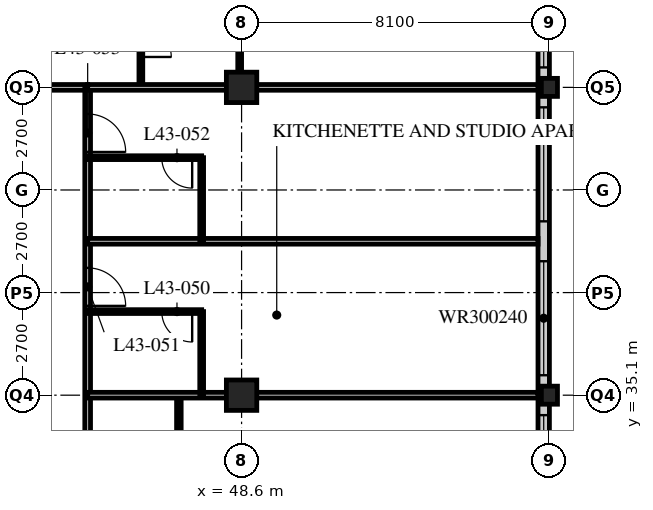
"""IFC4 building model, lengths in metres.
Left out: names, types, materials, properties, quantities, classifications, styles, units other than length and angle.
Written with IfcOpenShell. Run it as: python <this file> out.ifc"""

import sys

from ifc_helpers import new_model, si_unit, direction, frame, frame_2d, origin, origin_2d, place, context, subcontext, project, spatial, rectangle, hollow_rectangle, i_section, extrude, element, fill, save


model = new_model("IFC4")
c1 = context("Model", 3, precision=1e-05, world=origin(), true_north=direction((0.0, 1.0)))
c2 = subcontext(c1, "Body", "Model", "MODEL_VIEW")
j1 = project(units=[si_unit("LENGTHUNIT", "METRE"), si_unit("PLANEANGLEUNIT", "RADIAN")], contexts=[c1])
p1 = place(None, origin())
s1 = spatial("IfcSite", under=j1, at=p1, CompositionType="ELEMENT")
p2 = place(p1, origin())
s2 = spatial("IfcBuilding", under=s1, at=p2, CompositionType="ELEMENT")
p3 = place(p2, frame((0.0, 0.0, 170.4)))
s3 = spatial("IfcBuildingStorey", under=s2, at=p3, CompositionType="ELEMENT", Elevation=170.4)
for number, where, z_axis, x_axis in (
    (1, (48.6, 35.1, 0.0), (0.0, 0.0, 1.0), (1.0, 0.0, 0.0)),
    (2, (48.6, 43.2, 0.0), (0.0, 0.0, 1.0), (1.0, 0.0, 0.0)),
):
    element("IfcColumn", number, at=place(p3, frame(where, z_axis=z_axis, x_axis=x_axis)), inside=s3, PredefinedType="COLUMN", context=c2, shape_type="SweptSolid", body=[
        extrude(hollow_rectangle(XDim=0.8, YDim=0.8, WallThickness=0.08, at=origin_2d()), origin(), (0.0, 0.0, 1.0), 3.6),
    ])
for number, where, z_axis, x_axis in (
    (3, (56.7, 35.1, 0.0), (0.0, 0.0, 1.0), (1.0, 0.0, 0.0)),
    (4, (56.7, 43.2, 0.0), (0.0, 0.0, 1.0), (1.0, 0.0, 0.0)),
):
    element("IfcColumn", number, at=place(p3, frame(where, z_axis=z_axis, x_axis=x_axis)), inside=s3, PredefinedType="COLUMN", context=c2, shape_type="SweptSolid", body=[
        extrude(i_section(OverallWidth=0.424, OverallDepth=0.475, WebThickness=0.048, FlangeThickness=0.077, FilletRadius=0.015, at=origin_2d()), origin(), (0.0, 0.0, 1.0), 3.6),
    ])
p4 = place(p3, frame((56.55, 19.2, 0.0), z_axis=(0.0, 0.0, 1.0), x_axis=(0.0, 1.0, 0.0)))
e5 = element("IfcWall", 5, at=p4, inside=s3, PredefinedType="SOLIDWALL", context=c2, shape_type="SweptSolid", body=[
    extrude(rectangle(XDim=32.1, YDim=0.3, at=frame_2d((16.05, 0.0))), origin(), (0.0, 0.0, 1.0), 3.39),
])
p5 = place(p4, frame((0.225, 0.0, 0.6)))
e6 = element("IfcOpeningElement", 6, at=p5, cuts=e5, PredefinedType="OPENING", context=c2, shape_type="SweptSolid", body=[
    extrude(rectangle(XDim=3.0, YDim=2.4, at=frame_2d((1.5, 1.2))), frame((0.0, 0.16, 0.0), z_axis=(0.0, -1.0, 0.0), x_axis=(1.0, 0.0, 0.0)), (0.0, 0.0, 1.0), 0.32),
])
p6 = place(p4, frame((4.275, 0.0, 0.6)))
e7 = element("IfcOpeningElement", 7, at=p6, cuts=e5, PredefinedType="OPENING", context=c2, shape_type="SweptSolid", body=[
    extrude(rectangle(XDim=3.0, YDim=2.4, at=frame_2d((1.5, 1.2))), frame((0.0, 0.16, 0.0), z_axis=(0.0, -1.0, 0.0), x_axis=(1.0, 0.0, 0.0)), (0.0, 0.0, 1.0), 0.32),
])
p7 = place(p4, frame((8.325, 0.0, 0.6)))
e8 = element("IfcOpeningElement", 8, at=p7, cuts=e5, PredefinedType="OPENING", context=c2, shape_type="SweptSolid", body=[
    extrude(rectangle(XDim=3.0, YDim=2.4, at=frame_2d((1.5, 1.2))), frame((0.0, 0.16, 0.0), z_axis=(0.0, -1.0, 0.0), x_axis=(1.0, 0.0, 0.0)), (0.0, 0.0, 1.0), 0.32),
])
p8 = place(p4, frame((12.375, 0.0, 0.6)))
e9 = element("IfcOpeningElement", 9, at=p8, cuts=e5, PredefinedType="OPENING", context=c2, shape_type="SweptSolid", body=[
    extrude(rectangle(XDim=3.0, YDim=2.4, at=frame_2d((1.5, 1.2))), frame((0.0, 0.16, 0.0), z_axis=(0.0, -1.0, 0.0), x_axis=(1.0, 0.0, 0.0)), (0.0, 0.0, 1.0), 0.32),
])
p9 = place(p4, frame((16.425, 0.0, 0.6)))
e10 = element("IfcOpeningElement", 10, at=p9, cuts=e5, PredefinedType="OPENING", context=c2, shape_type="SweptSolid", body=[
    extrude(rectangle(XDim=3.0, YDim=2.4, at=frame_2d((1.5, 1.2))), frame((0.0, 0.16, 0.0), z_axis=(0.0, -1.0, 0.0), x_axis=(1.0, 0.0, 0.0)), (0.0, 0.0, 1.0), 0.32),
])
p10 = place(p4, frame((20.475, 0.0, 0.6)))
e11 = element("IfcOpeningElement", 11, at=p10, cuts=e5, PredefinedType="OPENING", context=c2, shape_type="SweptSolid", body=[
    extrude(rectangle(XDim=3.0, YDim=2.4, at=frame_2d((1.5, 1.2))), frame((0.0, 0.16, 0.0), z_axis=(0.0, -1.0, 0.0), x_axis=(1.0, 0.0, 0.0)), (0.0, 0.0, 1.0), 0.32),
])
p11 = place(p4, frame((24.525, 0.0, 0.6)))
e12 = element("IfcOpeningElement", 12, at=p11, cuts=e5, PredefinedType="OPENING", context=c2, shape_type="SweptSolid", body=[
    extrude(rectangle(XDim=3.0, YDim=2.4, at=frame_2d((1.5, 1.2))), frame((0.0, 0.16, 0.0), z_axis=(0.0, -1.0, 0.0), x_axis=(1.0, 0.0, 0.0)), (0.0, 0.0, 1.0), 0.32),
])
p12 = place(p4, frame((28.575, 0.0, 0.6)))
e13 = element("IfcOpeningElement", 13, at=p12, cuts=e5, PredefinedType="OPENING", context=c2, shape_type="SweptSolid", body=[
    extrude(rectangle(XDim=3.0, YDim=2.4, at=frame_2d((1.5, 1.2))), frame((0.0, 0.16, 0.0), z_axis=(0.0, -1.0, 0.0), x_axis=(1.0, 0.0, 0.0)), (0.0, 0.0, 1.0), 0.32),
])
p13 = place(p3, frame((12.15, 43.2, 0.0), z_axis=(0.0, 0.0, 1.0), x_axis=(1.0, 0.0, 0.0)))
e14 = element("IfcWall", 14, at=p13, inside=s3, PredefinedType="PARTITIONING", context=c2, shape_type="SweptSolid", body=[
    extrude(rectangle(XDim=32.4, YDim=0.15, at=frame_2d((16.2, 0.0))), origin(), (0.0, 0.0, 1.0), 2.778),
])
p14 = place(p13, frame((4.95, 0.0, 0.0)))
e15 = element("IfcOpeningElement", 15, at=p14, cuts=e14, PredefinedType="OPENING", context=c2, shape_type="SweptSolid", body=[
    extrude(rectangle(XDim=1.0, YDim=2.1, at=frame_2d((0.5, 1.05))), frame((0.0, 0.085, 0.0), z_axis=(0.0, -1.0, 0.0), x_axis=(1.0, 0.0, 0.0)), (0.0, 0.0, 1.0), 0.17),
])
p15 = place(p13, frame((13.05, 0.0, 0.0)))
e16 = element("IfcOpeningElement", 16, at=p15, cuts=e14, PredefinedType="OPENING", context=c2, shape_type="SweptSolid", body=[
    extrude(rectangle(XDim=1.0, YDim=2.1, at=frame_2d((0.5, 1.05))), frame((0.0, 0.085, 0.0), z_axis=(0.0, -1.0, 0.0), x_axis=(1.0, 0.0, 0.0)), (0.0, 0.0, 1.0), 0.17),
])
p16 = place(p13, frame((21.15, 0.0, 0.0)))
e17 = element("IfcOpeningElement", 17, at=p16, cuts=e14, PredefinedType="OPENING", context=c2, shape_type="SweptSolid", body=[
    extrude(rectangle(XDim=1.0, YDim=2.1, at=frame_2d((0.5, 1.05))), frame((0.0, 0.085, 0.0), z_axis=(0.0, -1.0, 0.0), x_axis=(1.0, 0.0, 0.0)), (0.0, 0.0, 1.0), 0.17),
])
p17 = place(p13, frame((29.875, 0.0, 0.0)))
e18 = element("IfcOpeningElement", 18, at=p17, cuts=e14, PredefinedType="OPENING", context=c2, shape_type="SweptSolid", body=[
    extrude(rectangle(XDim=1.0, YDim=2.1, at=frame_2d((0.5, 1.05))), frame((0.0, 0.085, 0.0), z_axis=(0.0, -1.0, 0.0), x_axis=(1.0, 0.0, 0.0)), (0.0, 0.0, 1.0), 0.17),
])
p18 = place(p13, frame((1.525, 0.0, 0.0)))
e19 = element("IfcOpeningElement", 19, at=p18, cuts=e14, PredefinedType="OPENING", context=c2, shape_type="SweptSolid", body=[
    extrude(rectangle(XDim=1.0, YDim=2.1, at=frame_2d((0.5, 1.05))), frame((0.0, 0.085, 0.0), z_axis=(0.0, -1.0, 0.0), x_axis=(1.0, 0.0, 0.0)), (0.0, 0.0, 1.0), 0.17),
])
p19 = place(p3, frame((44.55, 18.9, 0.0), z_axis=(0.0, 0.0, 1.0), x_axis=(0.0, 1.0, 0.0)))
e20 = element("IfcWall", 20, at=p19, inside=s3, PredefinedType="PARTITIONING", context=c2, shape_type="SweptSolid", body=[
    extrude(rectangle(XDim=24.3, YDim=0.15, at=frame_2d((12.15, 0.0))), origin(), (0.0, 0.0, 1.0), 3.39),
])
p20 = place(p19, frame((2.35, 0.0, 0.0)))
e21 = element("IfcOpeningElement", 21, at=p20, cuts=e20, PredefinedType="OPENING", context=c2, shape_type="SweptSolid", body=[
    extrude(rectangle(XDim=1.0, YDim=2.1, at=frame_2d((0.5, 1.05))), frame((0.0, 0.085, 0.0), z_axis=(0.0, -1.0, 0.0), x_axis=(1.0, 0.0, 0.0)), (0.0, 0.0, 1.0), 0.17),
])
p21 = place(p19, frame((4.45, 0.0, 0.0)))
e22 = element("IfcOpeningElement", 22, at=p21, cuts=e20, PredefinedType="OPENING", context=c2, shape_type="SweptSolid", body=[
    extrude(rectangle(XDim=1.0, YDim=2.1, at=frame_2d((0.5, 1.05))), frame((0.0, 0.085, 0.0), z_axis=(0.0, -1.0, 0.0), x_axis=(1.0, 0.0, 0.0)), (0.0, 0.0, 1.0), 0.17),
])
p22 = place(p19, frame((18.55, 0.0, 0.0)))
e23 = element("IfcOpeningElement", 23, at=p22, cuts=e20, PredefinedType="OPENING", context=c2, shape_type="SweptSolid", body=[
    extrude(rectangle(XDim=1.0, YDim=2.1, at=frame_2d((0.5, 1.05))), frame((0.0, 0.085, 0.0), z_axis=(0.0, -1.0, 0.0), x_axis=(1.0, 0.0, 0.0)), (0.0, 0.0, 1.0), 0.17),
])
p23 = place(p19, frame((22.6, 0.0, 0.0)))
e24 = element("IfcOpeningElement", 24, at=p23, cuts=e20, PredefinedType="OPENING", context=c2, shape_type="SweptSolid", body=[
    extrude(rectangle(XDim=1.0, YDim=2.1, at=frame_2d((0.5, 1.05))), frame((0.0, 0.085, 0.0), z_axis=(0.0, -1.0, 0.0), x_axis=(1.0, 0.0, 0.0)), (0.0, 0.0, 1.0), 0.17),
])
p24 = place(p3, frame((46.95, 22.95, 0.0), z_axis=(0.0, 0.0, 1.0), x_axis=(0.0, 1.0, 0.0)))
e25 = element("IfcWall", 25, at=p24, inside=s3, PredefinedType="PARTITIONING", context=c2, shape_type="SweptSolid", body=[
    extrude(rectangle(XDim=12.15, YDim=0.12, at=frame_2d((6.075, 0.0))), origin(), (0.0, 0.0, 1.0), 3.39),
])
p25 = place(p24, frame((0.975, 0.0, 0.0)))
e26 = element("IfcOpeningElement", 26, at=p25, cuts=e25, PredefinedType="OPENING", context=c2, shape_type="SweptSolid", body=[
    extrude(rectangle(XDim=0.85, YDim=2.1, at=frame_2d((0.425, 1.05))), frame((0.0, 0.07, 0.0), z_axis=(0.0, -1.0, 0.0), x_axis=(1.0, 0.0, 0.0)), (0.0, 0.0, 1.0), 0.14),
])
p26 = place(p24, frame((8.425, 0.0, 0.0)))
e27 = element("IfcOpeningElement", 27, at=p26, cuts=e25, PredefinedType="OPENING", context=c2, shape_type="SweptSolid", body=[
    extrude(rectangle(XDim=0.85, YDim=2.1, at=frame_2d((0.425, 1.05))), frame((0.0, 0.07, 0.0), z_axis=(0.0, -1.0, 0.0), x_axis=(1.0, 0.0, 0.0)), (0.0, 0.0, 1.0), 0.14),
])
p27 = place(p3, frame((44.55, 35.1, 0.0), z_axis=(0.0, 0.0, 1.0), x_axis=(1.0, 0.0, 0.0)))
e28 = element("IfcWall", 28, at=p27, inside=s3, PredefinedType="PARTITIONING", context=c2, shape_type="SweptSolid", body=[
    extrude(rectangle(XDim=11.85, YDim=0.15, at=frame_2d((5.925, 0.0))), origin(), (0.0, 0.0, 1.0), 2.778),
])
p28 = place(p3, frame((47.55, 35.1, 0.0), z_axis=(0.0, 0.0, 1.0), x_axis=(0.0, 1.0, 0.0)))
e29 = element("IfcWall", 29, at=p28, inside=s3, PredefinedType="PARTITIONING", context=c2, shape_type="SweptSolid", body=[
    extrude(rectangle(XDim=2.2, YDim=0.1, at=frame_2d((1.1, 0.0))), origin(), (0.0, 0.0, 1.0), 3.39),
])
p29 = place(p3, frame((44.55, 37.3, 0.0), z_axis=(0.0, 0.0, 1.0), x_axis=(1.0, 0.0, 0.0)))
e30 = element("IfcWall", 30, at=p29, inside=s3, PredefinedType="PARTITIONING", context=c2, shape_type="SweptSolid", body=[
    extrude(rectangle(XDim=3.0, YDim=0.1, at=frame_2d((1.5, 0.0))), origin(), (0.0, 0.0, 1.0), 3.39),
])
p30 = place(p29, frame((1.95, 0.0, 0.0)))
e31 = element("IfcOpeningElement", 31, at=p30, cuts=e30, PredefinedType="OPENING", context=c2, shape_type="SweptSolid", body=[
    extrude(rectangle(XDim=0.8, YDim=2.1, at=frame_2d((0.4, 1.05))), frame((0.0, 0.06, 0.0), z_axis=(0.0, -1.0, 0.0), x_axis=(1.0, 0.0, 0.0)), (0.0, 0.0, 1.0), 0.12),
])
p31 = place(p3, frame((44.55, 39.15, 0.0), z_axis=(0.0, 0.0, 1.0), x_axis=(1.0, 0.0, 0.0)))
e32 = element("IfcWall", 32, at=p31, inside=s3, PredefinedType="PARTITIONING", context=c2, shape_type="SweptSolid", body=[
    extrude(rectangle(XDim=11.85, YDim=0.15, at=frame_2d((5.925, 0.0))), origin(), (0.0, 0.0, 1.0), 3.39),
])
p32 = place(p3, frame((47.55, 39.15, 0.0), z_axis=(0.0, 0.0, 1.0), x_axis=(0.0, 1.0, 0.0)))
e33 = element("IfcWall", 33, at=p32, inside=s3, PredefinedType="PARTITIONING", context=c2, shape_type="SweptSolid", body=[
    extrude(rectangle(XDim=2.2, YDim=0.1, at=frame_2d((1.1, 0.0))), origin(), (0.0, 0.0, 1.0), 3.39),
])
p33 = place(p3, frame((44.55, 41.35, 0.0), z_axis=(0.0, 0.0, 1.0), x_axis=(1.0, 0.0, 0.0)))
e34 = element("IfcWall", 34, at=p33, inside=s3, PredefinedType="PARTITIONING", context=c2, shape_type="SweptSolid", body=[
    extrude(rectangle(XDim=3.0, YDim=0.1, at=frame_2d((1.5, 0.0))), origin(), (0.0, 0.0, 1.0), 3.39),
])
p34 = place(p33, frame((1.95, 0.0, 0.0)))
e35 = element("IfcOpeningElement", 35, at=p34, cuts=e34, PredefinedType="OPENING", context=c2, shape_type="SweptSolid", body=[
    extrude(rectangle(XDim=0.8, YDim=2.1, at=frame_2d((0.4, 1.05))), frame((0.0, 0.06, 0.0), z_axis=(0.0, -1.0, 0.0), x_axis=(1.0, 0.0, 0.0)), (0.0, 0.0, 1.0), 0.12),
])
p35 = place(p3, frame((45.95, 43.2, 0.0), z_axis=(0.0, 0.0, 1.0), x_axis=(0.0, 1.0, 0.0)))
e36 = element("IfcWall", 36, at=p35, inside=s3, PredefinedType="PARTITIONING", context=c2, shape_type="SweptSolid", body=[
    extrude(rectangle(XDim=2.4, YDim=0.1, at=frame_2d((1.2, 0.0))), origin(), (0.0, 0.0, 1.0), 3.39),
])
p36 = place(p35, frame((0.8, 0.0, 0.0)))
e37 = element("IfcOpeningElement", 37, at=p36, cuts=e36, PredefinedType="OPENING", context=c2, shape_type="SweptSolid", body=[
    extrude(rectangle(XDim=0.8, YDim=2.1, at=frame_2d((0.4, 1.05))), frame((0.0, 0.06, 0.0), z_axis=(0.0, -1.0, 0.0), x_axis=(1.0, 0.0, 0.0)), (0.0, 0.0, 1.0), 0.12),
])
p37 = place(p3, frame((48.55, 43.2, 0.0), z_axis=(0.0, 0.0, 1.0), x_axis=(0.0, 1.0, 0.0)))
e38 = element("IfcWall", 38, at=p37, inside=s3, PredefinedType="PARTITIONING", context=c2, shape_type="SweptSolid", body=[
    extrude(rectangle(XDim=2.4, YDim=0.1, at=frame_2d((1.2, 0.0))), origin(), (0.0, 0.0, 1.0), 2.778),
])
p38 = place(p3, frame((44.55, 43.2, 0.0), z_axis=(0.0, 0.0, 1.0), x_axis=(1.0, 0.0, 0.0)))
e39 = element("IfcWall", 39, at=p38, inside=s3, PredefinedType="PARTITIONING", context=c2, shape_type="SweptSolid", body=[
    extrude(rectangle(XDim=11.85, YDim=0.15, at=frame_2d((5.925, 0.0))), origin(), (0.0, 0.0, 1.0), 2.778),
])
p39 = place(p8, origin())
e40 = element("IfcWindow", 40, at=p39, inside=s3, PartitioningType="SINGLE_PANEL", PredefinedType="WINDOW", context=c2, shape_type="SweptSolid", body=[
    extrude(rectangle(XDim=3.0, YDim=2.4, at=frame_2d((1.5, 1.2))), frame((0.0, 0.03, 0.0), z_axis=(0.0, -1.0, 0.0), x_axis=(1.0, 0.0, 0.0)), (0.0, 0.0, 1.0), 0.06),
])
fill(e9, e40)
p40 = place(p9, origin())
e41 = element("IfcWindow", 41, at=p40, inside=s3, PartitioningType="SINGLE_PANEL", PredefinedType="WINDOW", context=c2, shape_type="SweptSolid", body=[
    extrude(rectangle(XDim=3.0, YDim=2.4, at=frame_2d((1.5, 1.2))), frame((0.0, 0.03, 0.0), z_axis=(0.0, -1.0, 0.0), x_axis=(1.0, 0.0, 0.0)), (0.0, 0.0, 1.0), 0.06),
])
fill(e10, e41)
p41 = place(p10, origin())
e42 = element("IfcWindow", 42, at=p41, inside=s3, PartitioningType="SINGLE_PANEL", PredefinedType="WINDOW", context=c2, shape_type="SweptSolid", body=[
    extrude(rectangle(XDim=3.0, YDim=2.4, at=frame_2d((1.5, 1.2))), frame((0.0, 0.03, 0.0), z_axis=(0.0, -1.0, 0.0), x_axis=(1.0, 0.0, 0.0)), (0.0, 0.0, 1.0), 0.06),
])
fill(e11, e42)
p42 = place(p11, origin())
e43 = element("IfcWindow", 43, at=p42, inside=s3, PartitioningType="SINGLE_PANEL", PredefinedType="WINDOW", context=c2, shape_type="SweptSolid", body=[
    extrude(rectangle(XDim=3.0, YDim=2.4, at=frame_2d((1.5, 1.2))), frame((0.0, 0.03, 0.0), z_axis=(0.0, -1.0, 0.0), x_axis=(1.0, 0.0, 0.0)), (0.0, 0.0, 1.0), 0.06),
])
fill(e12, e43)
p43 = place(p30, origin())
e44 = element("IfcDoor", 44, at=p43, inside=s3, OperationType="SINGLE_SWING_LEFT", PredefinedType="DOOR", context=c2, shape_type="SweptSolid", body=[
    extrude(rectangle(XDim=0.8, YDim=2.1, at=frame_2d((0.4, 1.05))), frame((0.0, 0.025, 0.0), z_axis=(0.0, -1.0, 0.0), x_axis=(1.0, 0.0, 0.0)), (0.0, 0.0, 1.0), 0.05),
])
fill(e31, e44)
p44 = place(p22, origin())
e45 = element("IfcDoor", 45, at=p44, inside=s3, OperationType="SINGLE_SWING_RIGHT", PredefinedType="DOOR", context=c2, shape_type="SweptSolid", body=[
    extrude(rectangle(XDim=1.0, YDim=2.1, at=frame_2d((0.5, 1.05))), frame((0.0, 0.025, 0.0), z_axis=(0.0, -1.0, 0.0), x_axis=(1.0, 0.0, 0.0)), (0.0, 0.0, 1.0), 0.05),
])
fill(e23, e45)
p45 = place(p34, origin())
e46 = element("IfcDoor", 46, at=p45, inside=s3, OperationType="SINGLE_SWING_LEFT", PredefinedType="DOOR", context=c2, shape_type="SweptSolid", body=[
    extrude(rectangle(XDim=0.8, YDim=2.1, at=frame_2d((0.4, 1.05))), frame((0.0, 0.025, 0.0), z_axis=(0.0, -1.0, 0.0), x_axis=(1.0, 0.0, 0.0)), (0.0, 0.0, 1.0), 0.05),
])
fill(e35, e46)
p46 = place(p23, origin())
e47 = element("IfcDoor", 47, at=p46, inside=s3, OperationType="SINGLE_SWING_RIGHT", PredefinedType="DOOR", context=c2, shape_type="SweptSolid", body=[
    extrude(rectangle(XDim=1.0, YDim=2.1, at=frame_2d((0.5, 1.05))), frame((0.0, 0.025, 0.0), z_axis=(0.0, -1.0, 0.0), x_axis=(1.0, 0.0, 0.0)), (0.0, 0.0, 1.0), 0.05),
])
fill(e24, e47)
p47 = place(p36, origin())
e48 = element("IfcDoor", 48, at=p47, inside=s3, OperationType="SINGLE_SWING_RIGHT", PredefinedType="DOOR", context=c2, shape_type="SweptSolid", body=[
    extrude(rectangle(XDim=0.8, YDim=2.1, at=frame_2d((0.4, 1.05))), frame((0.0, 0.025, 0.0), z_axis=(0.0, -1.0, 0.0), x_axis=(1.0, 0.0, 0.0)), (0.0, 0.0, 1.0), 0.05),
])
fill(e37, e48)
save(model, sys.argv[1])
